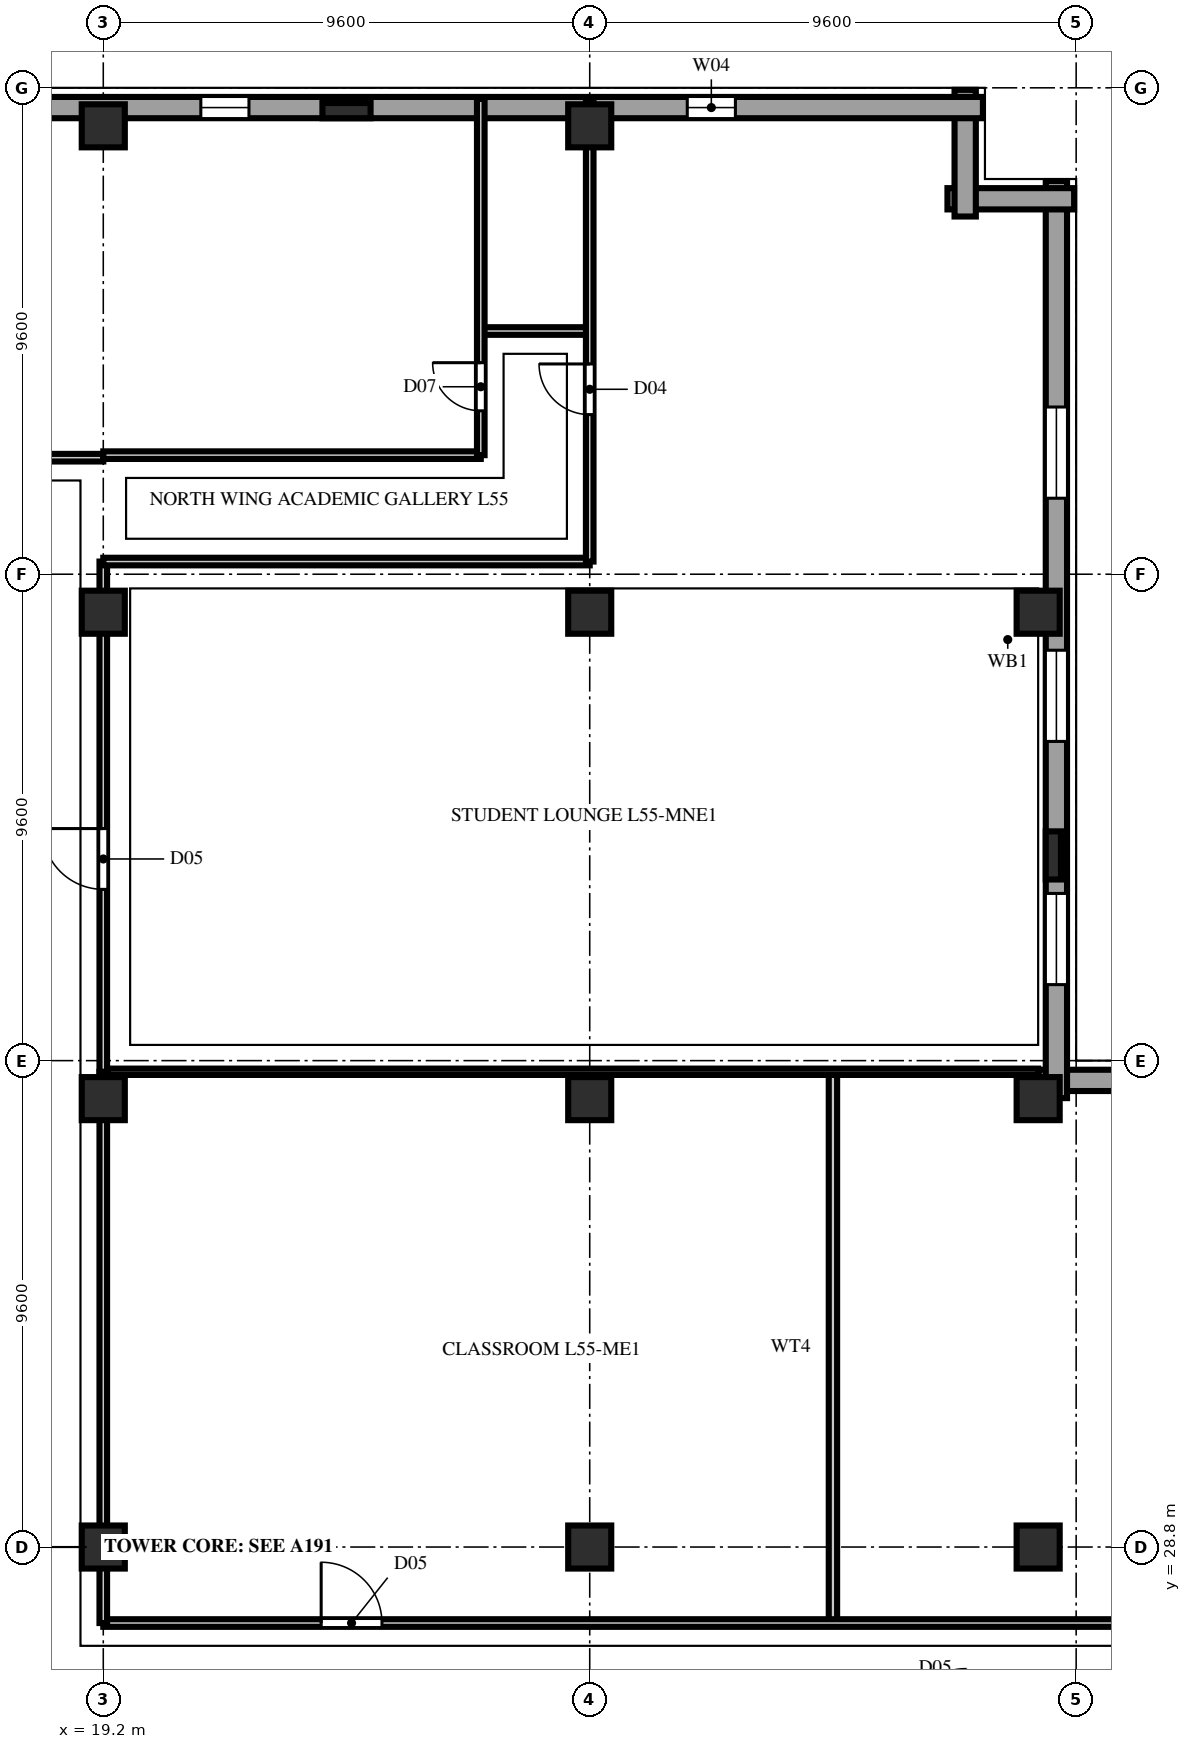
"""IFC4 building model, lengths in metres.
Left out: names, types, materials, properties, quantities, classifications, styles, units other than length and angle.
Written with IfcOpenShell. Run it as: python <this file> out.ifc"""

import sys

from ifc_helpers import new_model, si_unit, direction, frame, frame_2d, origin, origin_2d, place, context, subcontext, project, spatial, rectangle, extrude, element, fill, save


model = new_model("IFC4")
c1 = context("Model", 3, precision=1e-05, world=origin(), true_north=direction((0.0, 1.0)))
c2 = subcontext(c1, "Body", "Model", "MODEL_VIEW")
j1 = project(units=[si_unit("LENGTHUNIT", "METRE"), si_unit("PLANEANGLEUNIT", "RADIAN")], contexts=[c1])
p1 = place(None, origin())
s1 = spatial("IfcSite", under=j1, at=p1, CompositionType="ELEMENT")
p2 = place(p1, origin())
s2 = spatial("IfcBuilding", under=s1, at=p2, CompositionType="ELEMENT")
p3 = place(p2, frame((0.0, 0.0, 218.0)))
s3 = spatial("IfcBuildingStorey", under=s2, at=p3, CompositionType="ELEMENT", Elevation=218.0)
for number, where, z_axis, x_axis in (
    (1, (19.2, 28.8, 0.0), (0.0, 0.0, 1.0), (1.0, 0.0, 0.0)),
    (2, (19.2, 37.65, 0.0), (0.0, 0.0, 1.0), (1.0, 0.0, 0.0)),
    (3, (19.2, 47.25, 0.0), (0.0, 0.0, 1.0), (1.0, 0.0, 0.0)),
    (4, (19.2, 56.85, 0.0), (0.0, 0.0, 1.0), (1.0, 0.0, 0.0)),
    (5, (28.8, 28.8, 0.0), (0.0, 0.0, 1.0), (1.0, 0.0, 0.0)),
    (6, (28.8, 37.65, 0.0), (0.0, 0.0, 1.0), (1.0, 0.0, 0.0)),
    (7, (28.8, 47.25, 0.0), (0.0, 0.0, 1.0), (1.0, 0.0, 0.0)),
    (8, (28.8, 56.85, 0.0), (0.0, 0.0, 1.0), (1.0, 0.0, 0.0)),
    (9, (37.65, 28.8, 0.0), (0.0, 0.0, 1.0), (1.0, 0.0, 0.0)),
    (10, (37.65, 37.65, 0.0), (0.0, 0.0, 1.0), (1.0, 0.0, 0.0)),
    (11, (37.65, 47.25, 0.0), (0.0, 0.0, 1.0), (1.0, 0.0, 0.0)),
):
    element("IfcColumn", number, at=place(p3, frame(where, z_axis=z_axis, x_axis=x_axis)), inside=s3, PredefinedType="COLUMN", context=c2, shape_type="SweptSolid", body=[
        extrude(rectangle(XDim=0.85, YDim=0.85, at=origin_2d()), origin(), (0.0, 0.0, 1.0), 3.8),
    ])
for number, where, z_axis, x_axis in (
    (12, (24.0, 57.15, 0.0), (0.0, 0.0, 1.0), (1.0, 0.0, 0.0)),
    (13, (37.95, 42.45, 0.0), (0.0, 0.0, 1.0), (0.0, 1.0, 0.0)),
):
    element("IfcColumn", number, at=place(p3, frame(where, z_axis=z_axis, x_axis=x_axis)), inside=s3, PredefinedType="PILASTER", context=c2, shape_type="SweptSolid", body=[
        extrude(rectangle(XDim=0.95, YDim=0.3, at=origin_2d()), origin(), (0.0, 0.0, 1.0), 3.8),
    ])
p4 = place(p3, frame((55.76, 38.01, 0.0), z_axis=(0.0, 0.0, 1.0), x_axis=(-1.0, 0.0, 0.0)))
e14 = element("IfcWall", 14, at=p4, inside=s3, PredefinedType="SOLIDWALL", context=c2, shape_type="SweptSolid", body=[
    extrude(rectangle(XDim=18.1, YDim=0.42, at=frame_2d((9.05, 0.0))), origin(), (0.0, 0.0, 1.0), 3.54),
])
p5 = place(p4, frame((4.46, 0.0, 0.85)))
e15 = element("IfcOpeningElement", 15, at=p5, cuts=e14, PredefinedType="OPENING", context=c2, shape_type="SweptSolid", body=[
    extrude(rectangle(XDim=1.8, YDim=1.85, at=frame_2d((0.9, 0.925))), frame((0.0, 0.222, 0.0), z_axis=(0.0, -1.0, 0.0), x_axis=(1.0, 0.0, 0.0)), (0.0, 0.0, 1.0), 0.444),
])
p6 = place(p4, frame((9.26, 0.0, 0.85)))
e16 = element("IfcOpeningElement", 16, at=p6, cuts=e14, PredefinedType="OPENING", context=c2, shape_type="SweptSolid", body=[
    extrude(rectangle(XDim=1.8, YDim=1.85, at=frame_2d((0.9, 0.925))), frame((0.0, 0.222, 0.0), z_axis=(0.0, -1.0, 0.0), x_axis=(1.0, 0.0, 0.0)), (0.0, 0.0, 1.0), 0.444),
])
p7 = place(p4, frame((14.06, 0.0, 0.85)))
e17 = element("IfcOpeningElement", 17, at=p7, cuts=e14, PredefinedType="OPENING", context=c2, shape_type="SweptSolid", body=[
    extrude(rectangle(XDim=1.8, YDim=1.85, at=frame_2d((0.9, 0.925))), frame((0.0, 0.222, 0.0), z_axis=(0.0, -1.0, 0.0), x_axis=(1.0, 0.0, 0.0)), (0.0, 0.0, 1.0), 0.444),
])
p8 = place(p3, frame((38.01, 37.66, 0.0), z_axis=(0.0, 0.0, 1.0), x_axis=(0.0, 1.0, 0.0)))
e18 = element("IfcWall", 18, at=p8, inside=s3, PredefinedType="SOLIDWALL", context=c2, shape_type="SweptSolid", body=[
    extrude(rectangle(XDim=18.1, YDim=0.42, at=frame_2d((9.05, 0.0))), origin(), (0.0, 0.0, 1.0), 3.54),
])
p9 = place(p8, frame((2.24, 0.0, 0.85)))
e19 = element("IfcOpeningElement", 19, at=p9, cuts=e18, PredefinedType="OPENING", context=c2, shape_type="SweptSolid", body=[
    extrude(rectangle(XDim=1.8, YDim=1.85, at=frame_2d((0.9, 0.925))), frame((0.0, 0.222, 0.0), z_axis=(0.0, -1.0, 0.0), x_axis=(1.0, 0.0, 0.0)), (0.0, 0.0, 1.0), 0.444),
])
p10 = place(p8, frame((7.04, 0.0, 0.85)))
e20 = element("IfcOpeningElement", 20, at=p10, cuts=e18, PredefinedType="OPENING", context=c2, shape_type="SweptSolid", body=[
    extrude(rectangle(XDim=1.8, YDim=1.85, at=frame_2d((0.9, 0.925))), frame((0.0, 0.222, 0.0), z_axis=(0.0, -1.0, 0.0), x_axis=(1.0, 0.0, 0.0)), (0.0, 0.0, 1.0), 0.444),
])
p11 = place(p8, frame((11.84, 0.0, 0.85)))
e21 = element("IfcOpeningElement", 21, at=p11, cuts=e18, PredefinedType="OPENING", context=c2, shape_type="SweptSolid", body=[
    extrude(rectangle(XDim=1.8, YDim=1.85, at=frame_2d((0.9, 0.925))), frame((0.0, 0.222, 0.0), z_axis=(0.0, -1.0, 0.0), x_axis=(1.0, 0.0, 0.0)), (0.0, 0.0, 1.0), 0.444),
])
for number, where, z_axis, x_axis in (
    (22, (38.36, 55.41, 0.0), (0.0, 0.0, 1.0), (-1.0, 0.0, 0.0)),
    (23, (36.21, 55.06, 0.0), (0.0, 0.0, 1.0), (0.0, 1.0, 0.0)),
):
    element("IfcWall", number, at=place(p3, frame(where, z_axis=z_axis, x_axis=x_axis)), inside=s3, PredefinedType="SOLIDWALL", context=c2, shape_type="SweptSolid", body=[
        extrude(rectangle(XDim=2.5, YDim=0.42, at=frame_2d((1.25, 0.0))), origin(), (0.0, 0.0, 1.0), 3.54),
    ])
p12 = place(p3, frame((36.56, 57.21, 0.0), z_axis=(0.0, 0.0, 1.0), x_axis=(-1.0, 0.0, 0.0)))
e24 = element("IfcWall", 24, at=p12, inside=s3, PredefinedType="SOLIDWALL", context=c2, shape_type="SweptSolid", body=[
    extrude(rectangle(XDim=34.72, YDim=0.42, at=frame_2d((17.36, 0.0))), origin(), (0.0, 0.0, 1.0), 3.54),
])
p13 = place(p12, frame((4.885, 0.0, 0.9)))
e25 = element("IfcOpeningElement", 25, at=p13, cuts=e24, PredefinedType="OPENING", context=c2, shape_type="SweptSolid", body=[
    extrude(rectangle(XDim=0.95, YDim=1.85, at=frame_2d((0.475, 0.925))), frame((0.0, 0.222, 0.0), z_axis=(0.0, -1.0, 0.0), x_axis=(1.0, 0.0, 0.0)), (0.0, 0.0, 1.0), 0.444),
])
p14 = place(p12, frame((14.485, 0.0, 0.9)))
e26 = element("IfcOpeningElement", 26, at=p14, cuts=e24, PredefinedType="OPENING", context=c2, shape_type="SweptSolid", body=[
    extrude(rectangle(XDim=0.95, YDim=1.85, at=frame_2d((0.475, 0.925))), frame((0.0, 0.222, 0.0), z_axis=(0.0, -1.0, 0.0), x_axis=(1.0, 0.0, 0.0)), (0.0, 0.0, 1.0), 0.444),
])
p15 = place(p3, frame((17.05, 50.3, 0.0), z_axis=(0.0, 0.0, 1.0), x_axis=(1.0, 0.0, 0.0)))
e27 = element("IfcWall", 27, at=p15, inside=s3, PredefinedType="PARTITIONING", context=c2, shape_type="SweptSolid", body=[
    extrude(rectangle(XDim=2.15, YDim=0.15, at=frame_2d((1.075, 0.0))), origin(), (0.0, 0.0, 1.0), 3.54),
])
p16 = place(p3, frame((33.6, 27.3, 0.0), z_axis=(0.0, 0.0, 1.0), x_axis=(0.0, 1.0, 0.0)))
e28 = element("IfcWall", 28, at=p16, inside=s3, PredefinedType="PLUMBINGWALL", context=c2, shape_type="SweptSolid", body=[
    extrude(rectangle(XDim=10.88, YDim=0.165, at=frame_2d((5.44, 0.0))), origin(), (0.0, 0.0, 1.0), 3.54),
])
p17 = place(p3, frame((19.2, 27.3, 0.0), z_axis=(0.0, 0.0, 1.0), x_axis=(1.0, 0.0, 0.0)))
e29 = element("IfcWall", 29, at=p17, inside=s3, PredefinedType="PARTITIONING", context=c2, shape_type="SweptSolid", body=[
    extrude(rectangle(XDim=38.18, YDim=0.15, at=frame_2d((19.09, 0.0))), origin(), (0.0, 0.0, 1.0), 3.54),
])
p18 = place(p17, frame((4.3, 0.0, 0.0)))
e30 = element("IfcOpeningElement", 30, at=p18, cuts=e29, PredefinedType="OPENING", context=c2, shape_type="SweptSolid", body=[
    extrude(rectangle(XDim=1.2, YDim=2.2, at=frame_2d((0.6, 1.1))), frame((0.0, 0.087, 0.0), z_axis=(0.0, -1.0, 0.0), x_axis=(1.0, 0.0, 0.0)), (0.0, 0.0, 1.0), 0.174),
])
p19 = place(p17, frame((22.7, 0.0, 0.0)))
e31 = element("IfcOpeningElement", 31, at=p19, cuts=e29, PredefinedType="OPENING", context=c2, shape_type="SweptSolid", body=[
    extrude(rectangle(XDim=0.95, YDim=2.15, at=frame_2d((0.475, 1.075))), frame((0.0, 0.087, 0.0), z_axis=(0.0, -1.0, 0.0), x_axis=(1.0, 0.0, 0.0)), (0.0, 0.0, 1.0), 0.174),
])
p20 = place(p3, frame((19.2, 27.3, 0.0), z_axis=(0.0, 0.0, 1.0), x_axis=(0.0, 1.0, 0.0)))
e32 = element("IfcWall", 32, at=p20, inside=s3, PredefinedType="PARTITIONING", context=c2, shape_type="SweptSolid", body=[
    extrude(rectangle(XDim=10.88, YDim=0.15, at=frame_2d((5.44, 0.0))), origin(), (0.0, 0.0, 1.0), 2.924),
])
p21 = place(p3, frame((19.28, 38.18, 0.0), z_axis=(0.0, 0.0, 1.0), x_axis=(1.0, 0.0, 0.0)))
e33 = element("IfcWall", 33, at=p21, inside=s3, PredefinedType="PARTITIONING", context=c2, shape_type="SweptSolid", body=[
    extrude(rectangle(XDim=18.37, YDim=0.125, at=frame_2d((9.185, 0.0))), origin(), (0.0, 0.0, 1.0), 3.54),
])
p22 = place(p3, frame((19.2, 38.18, 0.0), z_axis=(0.0, 0.0, 1.0), x_axis=(0.0, 1.0, 0.0)))
e34 = element("IfcWall", 34, at=p22, inside=s3, PredefinedType="PARTITIONING", context=c2, shape_type="SweptSolid", body=[
    extrude(rectangle(XDim=10.07, YDim=0.15, at=frame_2d((5.035, 0.0))), origin(), (0.0, 0.0, 1.0), 2.924),
])
p23 = place(p22, frame((3.6, 0.0, 0.0)))
e35 = element("IfcOpeningElement", 35, at=p23, cuts=e34, PredefinedType="OPENING", context=c2, shape_type="SweptSolid", body=[
    extrude(rectangle(XDim=1.2, YDim=2.2, at=frame_2d((0.6, 1.1))), frame((0.0, 0.087, 0.0), z_axis=(0.0, -1.0, 0.0), x_axis=(1.0, 0.0, 0.0)), (0.0, 0.0, 1.0), 0.174),
])
p24 = place(p3, frame((19.2, 48.25, 0.0), z_axis=(0.0, 0.0, 1.0), x_axis=(1.0, 0.0, 0.0)))
e36 = element("IfcWall", 36, at=p24, inside=s3, PredefinedType="PARTITIONING", context=c2, shape_type="SweptSolid", body=[
    extrude(rectangle(XDim=9.6, YDim=0.15, at=frame_2d((4.8, 0.0))), origin(), (0.0, 0.0, 1.0), 3.54),
])
p25 = place(p3, frame((19.2, 50.35, 0.0), z_axis=(0.0, 0.0, 1.0), x_axis=(1.0, 0.0, 0.0)))
e37 = element("IfcWall", 37, at=p25, inside=s3, PredefinedType="PARTITIONING", context=c2, shape_type="SweptSolid", body=[
    extrude(rectangle(XDim=7.45, YDim=0.15, at=frame_2d((3.725, 0.0))), origin(), (0.0, 0.0, 1.0), 3.54),
])
p26 = place(p3, frame((26.65, 52.8, 0.0), z_axis=(0.0, 0.0, 1.0), x_axis=(1.0, 0.0, 0.0)))
e38 = element("IfcWall", 38, at=p26, inside=s3, PredefinedType="PARTITIONING", context=c2, shape_type="SweptSolid", body=[
    extrude(rectangle(XDim=2.15, YDim=0.15, at=frame_2d((1.075, 0.0))), origin(), (0.0, 0.0, 1.0), 3.54),
])
p27 = place(p3, frame((28.8, 48.25, 0.0), z_axis=(0.0, 0.0, 1.0), x_axis=(0.0, 1.0, 0.0)))
e39 = element("IfcWall", 39, at=p27, inside=s3, PredefinedType="PARTITIONING", context=c2, shape_type="SweptSolid", body=[
    extrude(rectangle(XDim=8.6, YDim=0.15, at=frame_2d((4.3, 0.0))), origin(), (0.0, 0.0, 1.0), 2.924),
])
p28 = place(p27, frame((2.9, 0.0, 0.0)))
e40 = element("IfcOpeningElement", 40, at=p28, cuts=e39, PredefinedType="OPENING", context=c2, shape_type="SweptSolid", body=[
    extrude(rectangle(XDim=1.0, YDim=2.2, at=frame_2d((0.5, 1.1))), frame((0.0, 0.087, 0.0), z_axis=(0.0, -1.0, 0.0), x_axis=(1.0, 0.0, 0.0)), (0.0, 0.0, 1.0), 0.174),
])
p29 = place(p3, frame((28.8, 56.85, 0.0), z_axis=(0.0, 0.0, 1.0), x_axis=(0.0, 1.0, 0.0)))
e41 = element("IfcWall", 41, at=p29, inside=s3, PredefinedType="PARTITIONING", context=c2, shape_type="SweptSolid", body=[
    extrude(rectangle(XDim=0.53, YDim=0.15, at=frame_2d((0.265, 0.0))), origin(), (0.0, 0.0, 1.0), 3.54),
])
p30 = place(p3, frame((26.65, 50.35, 0.0), z_axis=(0.0, 0.0, 1.0), x_axis=(0.0, 1.0, 0.0)))
e42 = element("IfcWall", 42, at=p30, inside=s3, PredefinedType="PARTITIONING", context=c2, shape_type="SweptSolid", body=[
    extrude(rectangle(XDim=7.03, YDim=0.15, at=frame_2d((3.515, 0.0))), origin(), (0.0, 0.0, 1.0), 3.54),
])
p31 = place(p30, frame((0.875, 0.0, 0.0)))
e43 = element("IfcOpeningElement", 43, at=p31, cuts=e42, PredefinedType="OPENING", context=c2, shape_type="SweptSolid", body=[
    extrude(rectangle(XDim=0.95, YDim=2.15, at=frame_2d((0.475, 1.075))), frame((0.0, 0.087, 0.0), z_axis=(0.0, -1.0, 0.0), x_axis=(1.0, 0.0, 0.0)), (0.0, 0.0, 1.0), 0.174),
])
p32 = place(p9, origin())
e44 = element("IfcWindow", 44, at=p32, inside=s3, PartitioningType="DOUBLE_PANEL_VERTICAL", PredefinedType="WINDOW", context=c2, shape_type="SweptSolid", body=[
    extrude(rectangle(XDim=1.8, YDim=1.85, at=frame_2d((0.9, 0.925))), frame((0.0, 0.11, 0.0), z_axis=(0.0, -1.0, 0.0), x_axis=(1.0, 0.0, 0.0)), (0.0, 0.0, 1.0), 0.06),
])
fill(e19, e44)
p33 = place(p10, origin())
e45 = element("IfcWindow", 45, at=p33, inside=s3, PartitioningType="DOUBLE_PANEL_VERTICAL", PredefinedType="WINDOW", context=c2, shape_type="SweptSolid", body=[
    extrude(rectangle(XDim=1.8, YDim=1.85, at=frame_2d((0.9, 0.925))), frame((0.0, 0.11, 0.0), z_axis=(0.0, -1.0, 0.0), x_axis=(1.0, 0.0, 0.0)), (0.0, 0.0, 1.0), 0.06),
])
fill(e20, e45)
p34 = place(p11, origin())
e46 = element("IfcWindow", 46, at=p34, inside=s3, PartitioningType="DOUBLE_PANEL_VERTICAL", PredefinedType="WINDOW", context=c2, shape_type="SweptSolid", body=[
    extrude(rectangle(XDim=1.8, YDim=1.85, at=frame_2d((0.9, 0.925))), frame((0.0, 0.11, 0.0), z_axis=(0.0, -1.0, 0.0), x_axis=(1.0, 0.0, 0.0)), (0.0, 0.0, 1.0), 0.06),
])
fill(e21, e46)
p35 = place(p13, origin())
e47 = element("IfcWindow", 47, at=p35, inside=s3, PartitioningType="SINGLE_PANEL", PredefinedType="WINDOW", context=c2, shape_type="SweptSolid", body=[
    extrude(rectangle(XDim=0.95, YDim=1.85, at=frame_2d((0.475, 0.925))), frame((0.0, 0.11, 0.0), z_axis=(0.0, -1.0, 0.0), x_axis=(1.0, 0.0, 0.0)), (0.0, 0.0, 1.0), 0.06),
])
fill(e25, e47)
p36 = place(p14, origin())
e48 = element("IfcWindow", 48, at=p36, inside=s3, PartitioningType="SINGLE_PANEL", PredefinedType="WINDOW", context=c2, shape_type="SweptSolid", body=[
    extrude(rectangle(XDim=0.95, YDim=1.85, at=frame_2d((0.475, 0.925))), frame((0.0, 0.11, 0.0), z_axis=(0.0, -1.0, 0.0), x_axis=(1.0, 0.0, 0.0)), (0.0, 0.0, 1.0), 0.06),
])
fill(e26, e48)
p37 = place(p18, origin())
e49 = element("IfcDoor", 49, at=p37, inside=s3, OperationType="SINGLE_SWING_LEFT", PredefinedType="DOOR", context=c2, shape_type="SweptSolid", body=[
    extrude(rectangle(XDim=1.2, YDim=2.2, at=frame_2d((0.6, 1.1))), frame((0.0, 0.025, 0.0), z_axis=(0.0, -1.0, 0.0), x_axis=(1.0, 0.0, 0.0)), (0.0, 0.0, 1.0), 0.05),
])
fill(e30, e49)
p38 = place(p23, origin())
e50 = element("IfcDoor", 50, at=p38, inside=s3, OperationType="SINGLE_SWING_RIGHT", PredefinedType="DOOR", context=c2, shape_type="SweptSolid", body=[
    extrude(rectangle(XDim=1.2, YDim=2.2, at=frame_2d((0.6, 1.1))), frame((0.0, 0.025, 0.0), z_axis=(0.0, -1.0, 0.0), x_axis=(1.0, 0.0, 0.0)), (0.0, 0.0, 1.0), 0.05),
])
fill(e35, e50)
p39 = place(p28, origin())
e51 = element("IfcDoor", 51, at=p39, inside=s3, OperationType="SINGLE_SWING_RIGHT", PredefinedType="DOOR", context=c2, shape_type="SweptSolid", body=[
    extrude(rectangle(XDim=1.0, YDim=2.2, at=frame_2d((0.5, 1.1))), frame((0.0, 0.025, 0.0), z_axis=(0.0, -1.0, 0.0), x_axis=(1.0, 0.0, 0.0)), (0.0, 0.0, 1.0), 0.05),
])
fill(e40, e51)
p40 = place(p31, origin())
e52 = element("IfcDoor", 52, at=p40, inside=s3, OperationType="SINGLE_SWING_RIGHT", PredefinedType="DOOR", context=c2, shape_type="SweptSolid", body=[
    extrude(rectangle(XDim=0.95, YDim=2.15, at=frame_2d((0.475, 1.075))), frame((0.0, 0.025, 0.0), z_axis=(0.0, -1.0, 0.0), x_axis=(1.0, 0.0, 0.0)), (0.0, 0.0, 1.0), 0.05),
])
fill(e43, e52)
save(model, sys.argv[1])
